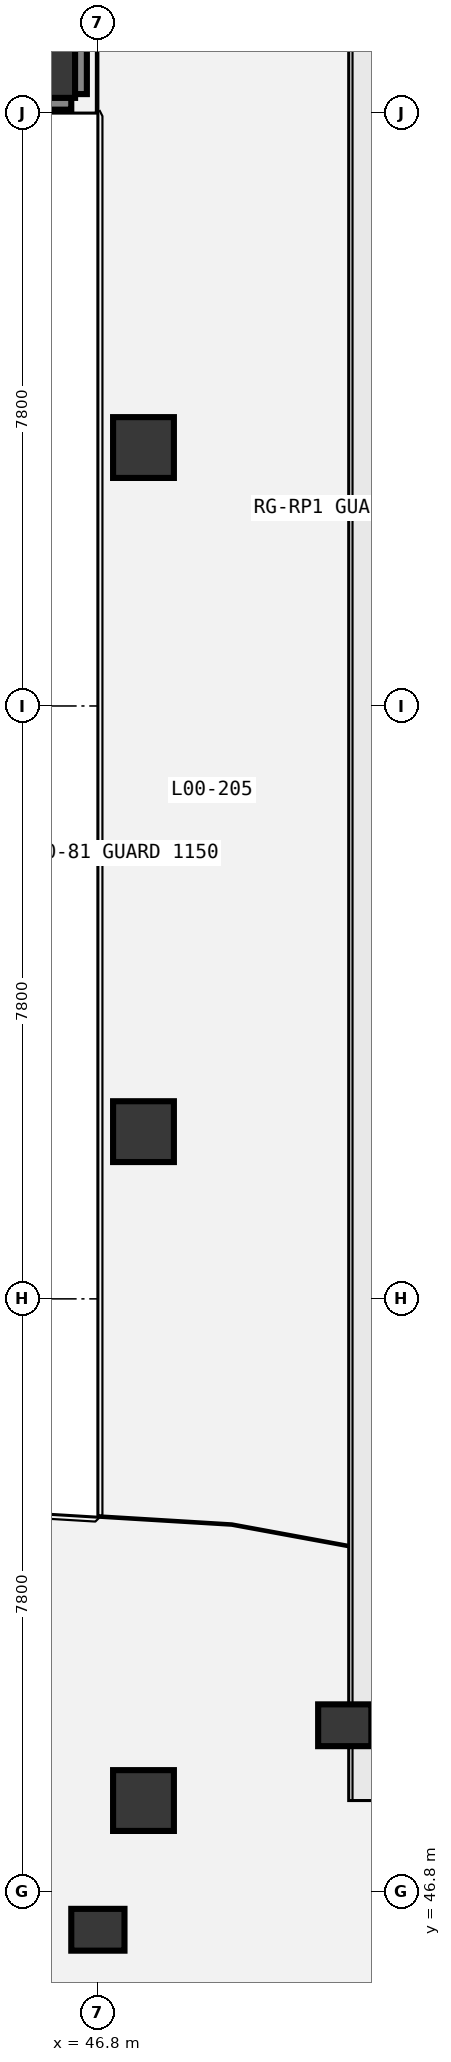
"""IFC4 building model, lengths in metres.
Left out: names, types, materials, properties, quantities, classifications, styles, units other than length and angle.
Written with IfcOpenShell. Run it as: python <this file> out.ifc"""

import sys

from ifc_helpers import new_model, si_unit, direction, frame, frame_2d, origin, origin_2d, place, context, subcontext, project, spatial, rectangle, extrude, element, save


model = new_model("IFC4")
c1 = context("Model", 3, precision=1e-05, world=origin(), true_north=direction((0.0, 1.0)))
c2 = subcontext(c1, "Body", "Model", "MODEL_VIEW")
j1 = project(units=[si_unit("LENGTHUNIT", "METRE"), si_unit("PLANEANGLEUNIT", "RADIAN")], contexts=[c1])
p1 = place(None, origin())
s1 = spatial("IfcSite", under=j1, at=p1, CompositionType="ELEMENT")
p2 = place(p1, origin())
s2 = spatial("IfcBuilding", under=s1, at=p2, CompositionType="ELEMENT")
p3 = place(p2, origin())
s3 = spatial("IfcBuildingStorey", under=s2, at=p3, CompositionType="ELEMENT", Elevation=0.0)
p4 = place(p3, frame((46.1, 70.8, 0.0), z_axis=(0.0, 0.0, 1.0), x_axis=(1.0, 0.0, 0.0)))
e1 = element("IfcColumn", 1, at=p4, inside=s3, PredefinedType="COLUMN", context=c2, shape_type="SweptSolid", body=[
    extrude(rectangle(XDim=0.8, YDim=0.8, at=origin_2d()), origin(), (0.0, 0.0, 1.0), 5.4),
])
for number, where, z_axis, x_axis in (
    (2, (50.048, 48.99, 0.0), (0.0, 0.0, 1.0), (1.0, 0.0, 0.0)),
    (3, (46.8, 46.3, 0.0), (0.0, 0.0, 1.0), (1.0, 0.0, 0.0)),
):
    element("IfcColumn", number, at=place(p3, frame(where, z_axis=z_axis, x_axis=x_axis)), inside=s3, PredefinedType="COLUMN", context=c2, shape_type="SweptSolid", body=[
        extrude(rectangle(XDim=0.7, YDim=0.55, at=origin_2d()), origin(), (0.0, 0.0, 1.0), 5.4),
    ])
for number, where, z_axis, x_axis in (
    (4, (47.4, 48.0, 0.0), (0.0, 0.0, 1.0), (1.0, 0.0, 0.0)),
    (5, (47.4, 56.8, 0.0), (0.0, 0.0, 1.0), (1.0, 0.0, 0.0)),
    (6, (47.4, 65.8, 0.0), (0.0, 0.0, 1.0), (1.0, 0.0, 0.0)),
):
    element("IfcColumn", number, at=place(p3, frame(where, z_axis=z_axis, x_axis=x_axis)), inside=s3, PredefinedType="COLUMN", context=c2, shape_type="SweptSolid", body=[
        extrude(rectangle(XDim=0.8, YDim=0.8, at=origin_2d()), origin(), (0.0, 0.0, 1.0), 5.4),
    ])
p5 = place(p3, frame((46.45, 70.45, 0.0), z_axis=(0.0, 0.0, 1.0), x_axis=(-1.0, 0.0, 0.0)))
e7 = element("IfcWall", 7, at=p5, inside=s3, PredefinedType="SOLIDWALL", context=c2, shape_type="SweptSolid", body=[
    extrude(rectangle(XDim=35.45, YDim=0.41, at=frame_2d((17.725, 0.0))), origin(), (0.0, 0.0, 1.0), 5.4),
])
p6 = place(p5, frame((17.95, 0.0, 0.0)))
e8 = element("IfcOpeningElement", 8, at=p6, cuts=e7, PredefinedType="OPENING", context=c2, shape_type="SweptSolid", body=[
    extrude(rectangle(XDim=2.4, YDim=2.6, at=frame_2d((1.2, 1.3))), frame((0.0, 0.215, 0.0), z_axis=(0.0, -1.0, 0.0), x_axis=(1.0, 0.0, 0.0)), (0.0, 0.0, 1.0), 0.43),
])
p7 = place(p5, frame((27.25, 0.0, 0.0)))
e9 = element("IfcOpeningElement", 9, at=p7, cuts=e7, PredefinedType="OPENING", context=c2, shape_type="SweptSolid", body=[
    extrude(rectangle(XDim=1.8, YDim=2.4, at=frame_2d((0.9, 1.2))), frame((0.0, 0.215, 0.0), z_axis=(0.0, -1.0, 0.0), x_axis=(1.0, 0.0, 0.0)), (0.0, 0.0, 1.0), 0.43),
])
p8 = place(p5, frame((2.55, 0.0, 0.95)))
e10 = element("IfcOpeningElement", 10, at=p8, cuts=e7, PredefinedType="OPENING", context=c2, shape_type="SweptSolid", body=[
    extrude(rectangle(XDim=1.8, YDim=2.1, at=frame_2d((0.9, 1.05))), frame((0.0, 0.215, 0.0), z_axis=(0.0, -1.0, 0.0), x_axis=(1.0, 0.0, 0.0)), (0.0, 0.0, 1.0), 0.43),
])
p9 = place(p3, frame((46.45, 70.45, 0.0), z_axis=(0.0, 0.0, 1.0), x_axis=(0.0, 1.0, 0.0)))
e11 = element("IfcWall", 11, at=p9, inside=s3, PredefinedType="SOLIDWALL", context=c2, shape_type="SweptSolid", body=[
    extrude(rectangle(XDim=46.3, YDim=0.41, at=frame_2d((23.15, 0.0))), origin(), (0.0, 0.0, 1.0), 5.4),
])
p10 = place(p9, frame((1.45, 0.0, 0.95)))
e12 = element("IfcOpeningElement", 12, at=p10, cuts=e11, PredefinedType="OPENING", context=c2, shape_type="SweptSolid", body=[
    extrude(rectangle(XDim=1.8, YDim=2.1, at=frame_2d((0.9, 1.05))), frame((0.0, 0.215, 0.0), z_axis=(0.0, -1.0, 0.0), x_axis=(1.0, 0.0, 0.0)), (0.0, 0.0, 1.0), 0.43),
])
save(model, sys.argv[1])
